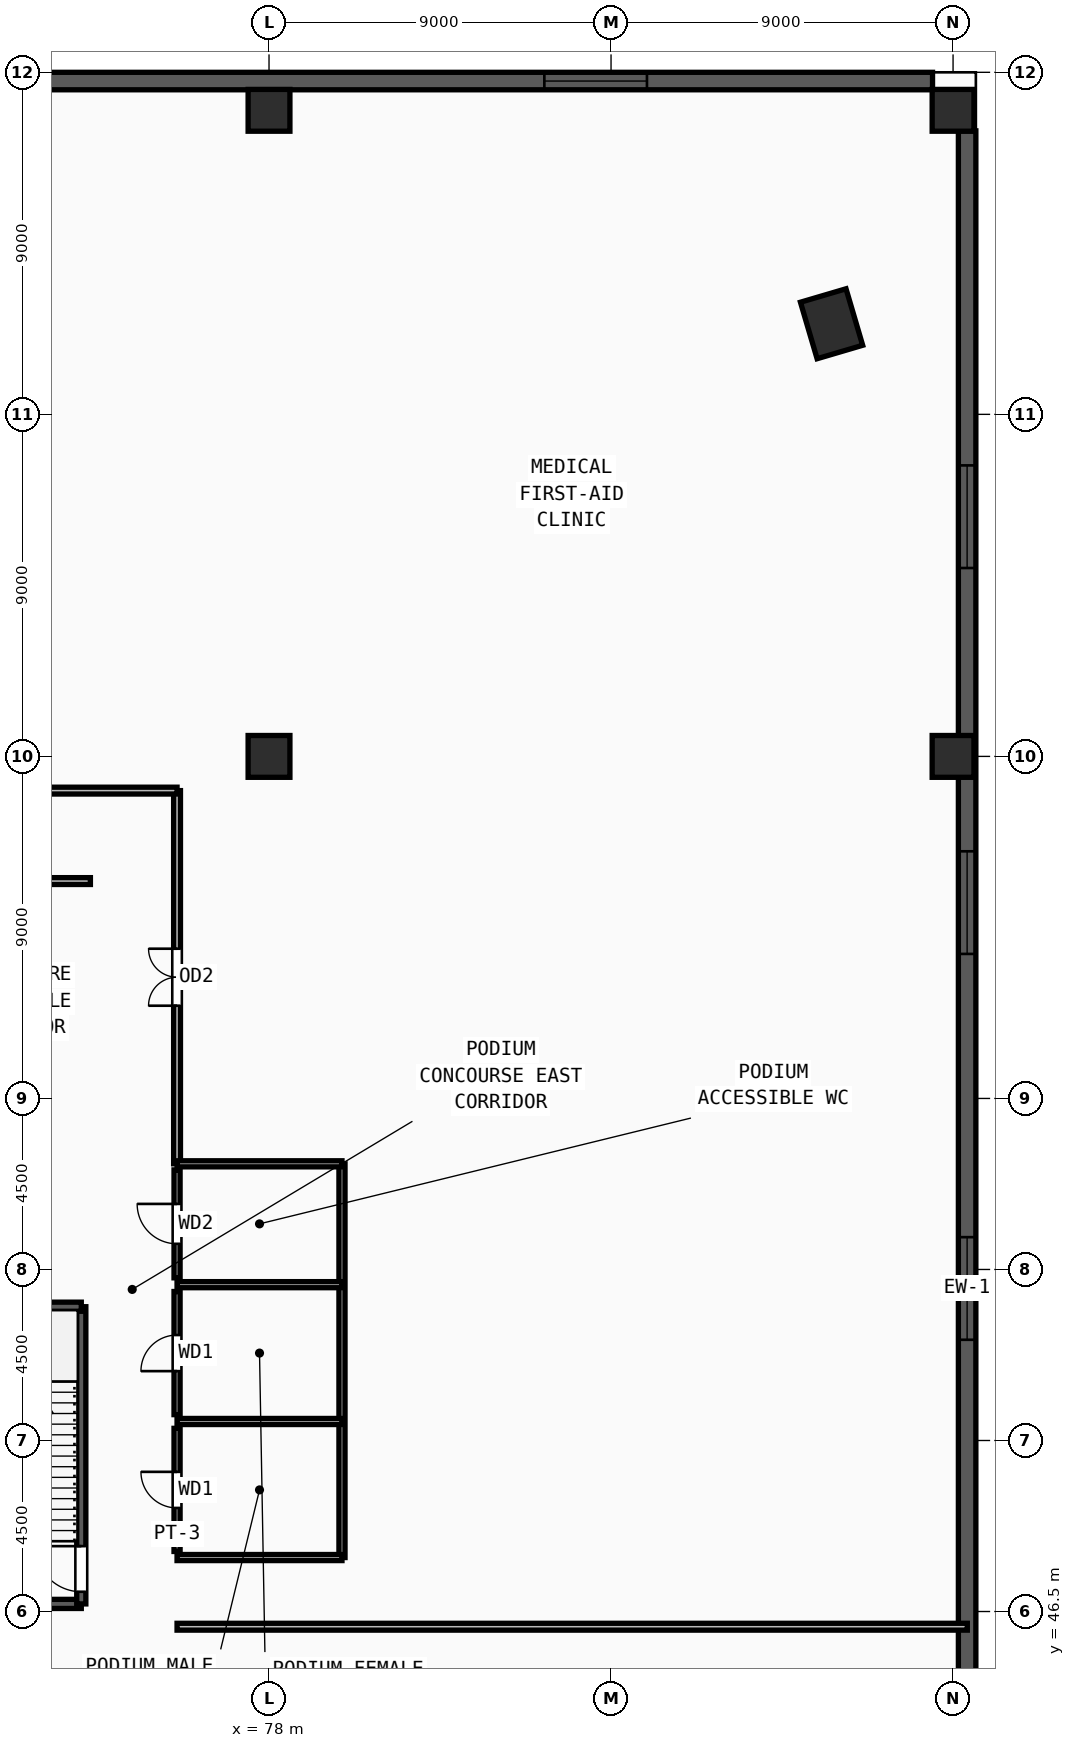
"""IFC4 building model, lengths in metres.
Left out: names, types, materials, properties, quantities, classifications, styles, units other than length and angle.
Written with IfcOpenShell. Run it as: python <this file> out.ifc"""

import sys

from ifc_helpers import new_model, si_unit, direction, frame, frame_2d, origin, origin_2d, place, context, subcontext, project, spatial, rectangle, extrude, source, transform, mapped, element, fill, save


model = new_model("IFC4")
c1 = context("Model", 3, precision=1e-05, world=origin(), true_north=direction((0.0, 1.0)))
c2 = subcontext(c1, "Body", "Model", "MODEL_VIEW")
j1 = project(units=[si_unit("LENGTHUNIT", "METRE"), si_unit("PLANEANGLEUNIT", "RADIAN")], contexts=[c1])
p1 = place(None, origin())
s1 = spatial("IfcSite", under=j1, at=p1, CompositionType="ELEMENT")
p2 = place(p1, origin())
s2 = spatial("IfcBuilding", under=s1, at=p2, CompositionType="ELEMENT")
p3 = place(p2, frame((0.0, 0.0, 23.4)))
s3 = spatial("IfcBuildingStorey", under=s2, at=p3, CompositionType="ELEMENT", Elevation=23.4)
m1 = source(origin(), c2, "Body", "SweptSolid", [
    extrude(rectangle(XDim=1.55, YDim=1.25, at=origin_2d()), origin(), (0.0, 0.0, 1.0), 5.1),
])
p4 = place(p3, frame((92.803, 80.384, 0.0), z_axis=(0.0, 0.0, 1.0), x_axis=(-0.282676303383, 0.959215360337, 0.0)))
e1 = element("IfcColumn", 1, at=p4, inside=s3, PredefinedType="COLUMN", context=c2, shape_type="MappedRepresentation", body=[
    mapped(m1, transform((0.0, 0.0, 0.0), x_axis=(1.0, 0.0, 0.0), y_axis=(0.0, 1.0, 0.0), z_axis=(0.0, 0.0, 1.0), scale=1.0)),
])
m2 = source(origin(), c2, "Body", "SweptSolid", [
    extrude(rectangle(XDim=1.1, YDim=1.1, at=origin_2d()), origin(), (0.0, 0.0, 1.0), 5.1),
])
for number, where, z_axis, x_axis in (
    (2, (78.0, 69.0, 0.0), (0.0, 0.0, 1.0), (1.0, 0.0, 0.0)),
    (3, (96.0, 69.0, 0.0), (0.0, 0.0, 1.0), (1.0, 0.0, 0.0)),
    (4, (78.0, 86.0, 0.0), (0.0, 0.0, 1.0), (1.0, 0.0, 0.0)),
    (5, (96.0, 86.0, 0.0), (0.0, 0.0, 1.0), (1.0, 0.0, 0.0)),
):
    element("IfcColumn", number, at=place(p3, frame(where, z_axis=z_axis, x_axis=x_axis)), inside=s3, PredefinedType="COLUMN", context=c2, shape_type="MappedRepresentation", body=[
        mapped(m2, transform((0.0, 0.0, 0.0), x_axis=(1.0, 0.0, 0.0), y_axis=(0.0, 1.0, 0.0), z_axis=(0.0, 0.0, 1.0), scale=1.0)),
    ])
p5 = place(p3, frame((96.37, 24.54, 0.0), z_axis=(0.0, 0.0, 1.0), x_axis=(0.0, 1.0, 0.0)))
e6 = element("IfcWall", 6, at=p5, inside=s3, PredefinedType="SOLIDWALL", context=c2, shape_type="SweptSolid", body=[
    extrude(rectangle(XDim=60.92, YDim=0.46, at=frame_2d((30.46, 0.0))), origin(), (0.0, 0.0, 1.0), 4.82),
])
m3 = source(origin(), c2, "Body", "SweptSolid", [
    extrude(rectangle(XDim=2.7, YDim=2.35, at=frame_2d((1.35, 1.175))), frame((0.0, 0.24, 0.0), z_axis=(0.0, -1.0, 0.0), x_axis=(1.0, 0.0, 0.0)), (0.0, 0.0, 1.0), 0.48),
])
p6 = place(p5, frame((8.803, 0.0, 0.55)))
e7 = element("IfcOpeningElement", 7, at=p6, cuts=e6, PredefinedType="OPENING", context=c2, shape_type="MappedRepresentation", body=[
    mapped(m3, transform((0.0, 0.0, 0.0), x_axis=(1.0, 0.0, 0.0), y_axis=(0.0, 1.0, 0.0), z_axis=(0.0, 0.0, 1.0), scale=1.0)),
])
p7 = place(p5, frame((29.11, 0.0, 0.55)))
e8 = element("IfcOpeningElement", 8, at=p7, cuts=e6, PredefinedType="OPENING", context=c2, shape_type="MappedRepresentation", body=[
    mapped(m3, transform((0.0, 0.0, 0.0), x_axis=(1.0, 0.0, 0.0), y_axis=(0.0, 1.0, 0.0), z_axis=(0.0, 0.0, 1.0), scale=1.0)),
])
p8 = place(p5, frame((39.263, 0.0, 0.55)))
e9 = element("IfcOpeningElement", 9, at=p8, cuts=e6, PredefinedType="OPENING", context=c2, shape_type="MappedRepresentation", body=[
    mapped(m3, transform((0.0, 0.0, 0.0), x_axis=(1.0, 0.0, 0.0), y_axis=(0.0, 1.0, 0.0), z_axis=(0.0, 0.0, 1.0), scale=1.0)),
])
p9 = place(p5, frame((49.417, 0.0, 0.55)))
e10 = element("IfcOpeningElement", 10, at=p9, cuts=e6, PredefinedType="OPENING", context=c2, shape_type="MappedRepresentation", body=[
    mapped(m3, transform((0.0, 0.0, 0.0), x_axis=(1.0, 0.0, 0.0), y_axis=(0.0, 1.0, 0.0), z_axis=(0.0, 0.0, 1.0), scale=1.0)),
])
p10 = place(p3, frame((95.46, 86.77, 0.0), z_axis=(0.0, 0.0, 1.0), x_axis=(-1.0, 0.0, 0.0)))
e11 = element("IfcWall", 11, at=p10, inside=s3, PredefinedType="SOLIDWALL", context=c2, shape_type="SweptSolid", body=[
    extrude(rectangle(XDim=70.92, YDim=0.46, at=frame_2d((35.46, 0.0))), origin(), (0.0, 0.0, 1.0), 4.82),
])
p11 = place(p10, frame((7.515, 0.0, 0.55)))
e12 = element("IfcOpeningElement", 12, at=p11, cuts=e11, PredefinedType="OPENING", context=c2, shape_type="MappedRepresentation", body=[
    mapped(m3, transform((0.0, 0.0, 0.0), x_axis=(1.0, 0.0, 0.0), y_axis=(0.0, 1.0, 0.0), z_axis=(0.0, 0.0, 1.0), scale=1.0)),
])
p12 = place(p10, frame((25.245, 0.0, 0.55)))
e13 = element("IfcOpeningElement", 13, at=p12, cuts=e11, PredefinedType="OPENING", context=c2, shape_type="MappedRepresentation", body=[
    mapped(m3, transform((0.0, 0.0, 0.0), x_axis=(1.0, 0.0, 0.0), y_axis=(0.0, 1.0, 0.0), z_axis=(0.0, 0.0, 1.0), scale=1.0)),
])
p13 = place(p10, frame((34.11, 0.0, 0.55)))
e14 = element("IfcOpeningElement", 14, at=p13, cuts=e11, PredefinedType="OPENING", context=c2, shape_type="MappedRepresentation", body=[
    mapped(m3, transform((0.0, 0.0, 0.0), x_axis=(1.0, 0.0, 0.0), y_axis=(0.0, 1.0, 0.0), z_axis=(0.0, 0.0, 1.0), scale=1.0)),
])
p14 = place(p10, frame((42.975, 0.0, 0.55)))
e15 = element("IfcOpeningElement", 15, at=p14, cuts=e11, PredefinedType="OPENING", context=c2, shape_type="MappedRepresentation", body=[
    mapped(m3, transform((0.0, 0.0, 0.0), x_axis=(1.0, 0.0, 0.0), y_axis=(0.0, 1.0, 0.0), z_axis=(0.0, 0.0, 1.0), scale=1.0)),
])
p15 = place(p10, frame((60.705, 0.0, 0.55)))
e16 = element("IfcOpeningElement", 16, at=p15, cuts=e11, PredefinedType="OPENING", context=c2, shape_type="MappedRepresentation", body=[
    mapped(m3, transform((0.0, 0.0, 0.0), x_axis=(1.0, 0.0, 0.0), y_axis=(0.0, 1.0, 0.0), z_axis=(0.0, 0.0, 1.0), scale=1.0)),
])
p16 = place(p3, frame((69.62, 46.7, 0.0), z_axis=(0.0, 0.0, 1.0), x_axis=(1.0, 0.0, 0.0)))
e17 = element("IfcWall", 17, at=p16, inside=s3, PredefinedType="SOLIDWALL", context=c2, shape_type="SweptSolid", body=[
    extrude(rectangle(XDim=3.44, YDim=0.24, at=frame_2d((1.72, 0.0))), origin(), (0.0, 0.0, 1.0), 3.335),
])
p17 = place(p3, frame((73.06, 46.7, 0.0), z_axis=(0.0, 0.0, 1.0), x_axis=(0.0, 1.0, 0.0)))
e18 = element("IfcWall", 18, at=p17, inside=s3, PredefinedType="SOLIDWALL", context=c2, shape_type="SweptSolid", body=[
    extrude(rectangle(XDim=7.82, YDim=0.24, at=frame_2d((3.91, 0.0))), origin(), (0.0, 0.0, 1.0), 4.82),
])
m4 = source(origin(), c2, "Body", "SweptSolid", [
    extrude(rectangle(XDim=1.2, YDim=2.2, at=frame_2d((0.6, 1.1))), frame((0.0, 0.13, 0.0), z_axis=(0.0, -1.0, 0.0), x_axis=(1.0, 0.0, 0.0)), (0.0, 0.0, 1.0), 0.26),
])
p18 = place(p17, frame((0.32, 0.0, 0.0)))
e19 = element("IfcOpeningElement", 19, at=p18, cuts=e18, PredefinedType="OPENING", context=c2, shape_type="MappedRepresentation", body=[
    mapped(m4, transform((0.0, 0.0, 0.0), x_axis=(1.0, 0.0, 0.0), y_axis=(0.0, 1.0, 0.0), z_axis=(0.0, 0.0, 1.0), scale=1.0)),
])
p19 = place(p3, frame((73.06, 54.52, 0.0), z_axis=(0.0, 0.0, 1.0), x_axis=(-1.0, 0.0, 0.0)))
e20 = element("IfcWall", 20, at=p19, inside=s3, PredefinedType="SOLIDWALL", context=c2, shape_type="SweptSolid", body=[
    extrude(rectangle(XDim=3.44, YDim=0.24, at=frame_2d((1.72, 0.0))), origin(), (0.0, 0.0, 1.0), 4.82),
])
p20 = place(p3, frame((75.58, 48.08, 0.0), z_axis=(0.0, 0.0, 1.0), x_axis=(0.0, 1.0, 0.0)))
e21 = element("IfcWall", 21, at=p20, inside=s3, PredefinedType="PARTITIONING", context=c2, shape_type="SweptSolid", body=[
    extrude(rectangle(XDim=3.24, YDim=0.16, at=frame_2d((1.62, 0.0))), origin(), (0.0, 0.0, 1.0), 4.82),
])
m5 = source(origin(), c2, "Body", "SweptSolid", [
    extrude(rectangle(XDim=0.95, YDim=2.15, at=frame_2d((0.475, 1.075))), frame((0.0, 0.09, 0.0), z_axis=(0.0, -1.0, 0.0), x_axis=(1.0, 0.0, 0.0)), (0.0, 0.0, 1.0), 0.18),
])
p21 = place(p20, frame((1.145, 0.0, 0.0)))
e22 = element("IfcOpeningElement", 22, at=p21, cuts=e21, PredefinedType="OPENING", context=c2, shape_type="MappedRepresentation", body=[
    mapped(m5, transform((0.0, 0.0, 0.0), x_axis=(1.0, 0.0, 0.0), y_axis=(0.0, 1.0, 0.0), z_axis=(0.0, 0.0, 1.0), scale=1.0)),
])
p22 = place(p3, frame((75.58, 51.68, 0.0), z_axis=(0.0, 0.0, 1.0), x_axis=(0.0, 1.0, 0.0)))
e23 = element("IfcWall", 23, at=p22, inside=s3, PredefinedType="PARTITIONING", context=c2, shape_type="SweptSolid", body=[
    extrude(rectangle(XDim=3.24, YDim=0.16, at=frame_2d((1.62, 0.0))), origin(), (0.0, 0.0, 1.0), 4.82),
])
p23 = place(p22, frame((1.145, 0.0, 0.0)))
e24 = element("IfcOpeningElement", 24, at=p23, cuts=e23, PredefinedType="OPENING", context=c2, shape_type="MappedRepresentation", body=[
    mapped(m5, transform((0.0, 0.0, 0.0), x_axis=(1.0, 0.0, 0.0), y_axis=(0.0, 1.0, 0.0), z_axis=(0.0, 0.0, 1.0), scale=1.0)),
])
p24 = place(p3, frame((75.58, 55.28, 0.0), z_axis=(0.0, 0.0, 1.0), x_axis=(0.0, 1.0, 0.0)))
e25 = element("IfcWall", 25, at=p24, inside=s3, PredefinedType="PARTITIONING", context=c2, shape_type="SweptSolid", body=[
    extrude(rectangle(XDim=2.84, YDim=0.16, at=frame_2d((1.42, 0.0))), origin(), (0.0, 0.0, 1.0), 4.82),
])
m6 = source(origin(), c2, "Body", "SweptSolid", [
    extrude(rectangle(XDim=1.05, YDim=2.15, at=frame_2d((0.525, 1.075))), frame((0.0, 0.09, 0.0), z_axis=(0.0, -1.0, 0.0), x_axis=(1.0, 0.0, 0.0)), (0.0, 0.0, 1.0), 0.18),
])
p25 = place(p24, frame((0.895, 0.0, 0.0)))
e26 = element("IfcOpeningElement", 26, at=p25, cuts=e25, PredefinedType="OPENING", context=c2, shape_type="MappedRepresentation", body=[
    mapped(m6, transform((0.0, 0.0, 0.0), x_axis=(1.0, 0.0, 0.0), y_axis=(0.0, 1.0, 0.0), z_axis=(0.0, 0.0, 1.0), scale=1.0)),
])
p26 = place(p3, frame((69.46, 65.72, 0.0), z_axis=(0.0, 0.0, 1.0), x_axis=(1.0, 0.0, 0.0)))
e27 = element("IfcWall", 27, at=p26, inside=s3, PredefinedType="PARTITIONING", context=c2, shape_type="SweptSolid", body=[
    extrude(rectangle(XDim=3.84, YDim=0.18, at=frame_2d((1.92, 0.0))), origin(), (0.0, 0.0, 1.0), 4.82),
])
m7 = source(origin(), c2, "Body", "SweptSolid", [
    extrude(rectangle(XDim=1.3, YDim=2.2, at=frame_2d((0.65, 1.1))), frame((0.0, 0.1, 0.0), z_axis=(0.0, -1.0, 0.0), x_axis=(1.0, 0.0, 0.0)), (0.0, 0.0, 1.0), 0.2),
])
p27 = place(p26, frame((1.27, 0.0, 0.0)))
e28 = element("IfcOpeningElement", 28, at=p27, cuts=e27, PredefinedType="OPENING", context=c2, shape_type="MappedRepresentation", body=[
    mapped(m7, transform((0.0, 0.0, 0.0), x_axis=(1.0, 0.0, 0.0), y_axis=(0.0, 1.0, 0.0), z_axis=(0.0, 0.0, 1.0), scale=1.0)),
])
p28 = place(p3, frame((75.58, 58.28, 0.0), z_axis=(0.0, 0.0, 1.0), x_axis=(0.0, 1.0, 0.0)))
e29 = element("IfcWall", 29, at=p28, inside=s3, PredefinedType="PARTITIONING", context=c2, shape_type="SweptSolid", body=[
    extrude(rectangle(XDim=9.82, YDim=0.18, at=frame_2d((4.91, 0.0))), origin(), (0.0, 0.0, 1.0), 4.82),
])
m8 = source(origin(), c2, "Body", "SweptSolid", [
    extrude(rectangle(XDim=1.5, YDim=2.2, at=frame_2d((0.75, 1.1))), frame((0.0, 0.1, 0.0), z_axis=(0.0, -1.0, 0.0), x_axis=(1.0, 0.0, 0.0)), (0.0, 0.0, 1.0), 0.2),
])
p29 = place(p28, frame((4.16, 0.0, 0.0)))
e30 = element("IfcOpeningElement", 30, at=p29, cuts=e29, PredefinedType="OPENING", context=c2, shape_type="MappedRepresentation", body=[
    mapped(m8, transform((0.0, 0.0, 0.0), x_axis=(1.0, 0.0, 0.0), y_axis=(0.0, 1.0, 0.0), z_axis=(0.0, 0.0, 1.0), scale=1.0)),
])
p30 = place(p3, frame((79.92, 47.92, 0.0), z_axis=(0.0, 0.0, 1.0), x_axis=(0.0, 1.0, 0.0)))
e31 = element("IfcWall", 31, at=p30, inside=s3, PredefinedType="PARTITIONING", context=c2, shape_type="SweptSolid", body=[
    extrude(rectangle(XDim=10.36, YDim=0.16, at=frame_2d((5.18, 0.0))), origin(), (0.0, 0.0, 1.0), 4.82),
])
for number, where, z_axis, x_axis in (
    (32, (75.58, 47.92, 0.0), (0.0, 0.0, 1.0), (1.0, 0.0, 0.0)),
    (33, (75.58, 51.5, 0.0), (0.0, 0.0, 1.0), (1.0, 0.0, 0.0)),
    (34, (75.58, 55.1, 0.0), (0.0, 0.0, 1.0), (1.0, 0.0, 0.0)),
    (35, (75.58, 58.28, 0.0), (0.0, 0.0, 1.0), (1.0, 0.0, 0.0)),
):
    element("IfcWall", number, at=place(p3, frame(where, z_axis=z_axis, x_axis=x_axis)), inside=s3, PredefinedType="PARTITIONING", context=c2, shape_type="SweptSolid", body=[
        extrude(rectangle(XDim=4.34, YDim=0.16, at=frame_2d((2.17, 0.0))), origin(), (0.0, 0.0, 1.0), 4.82),
    ])
p31 = place(p3, frame((75.58, 46.1, 0.0), z_axis=(0.0, 0.0, 1.0), x_axis=(1.0, 0.0, 0.0)))
e36 = element("IfcWall", 36, at=p31, inside=s3, PredefinedType="PARTITIONING", context=c2, shape_type="SweptSolid", body=[
    extrude(rectangle(XDim=20.795, YDim=0.18, at=frame_2d((10.397, 0.0))), origin(), (0.0, 0.0, 1.0), 4.82),
])
p32 = place(p3, frame((71.7, 68.1, 0.0), z_axis=(0.0, 0.0, 1.0), x_axis=(1.0, 0.0, 0.0)))
e37 = element("IfcWall", 37, at=p32, inside=s3, PredefinedType="PARTITIONING", context=c2, shape_type="SweptSolid", body=[
    extrude(rectangle(XDim=3.88, YDim=0.18, at=frame_2d((1.94, 0.0))), origin(), (0.0, 0.0, 1.0), 4.82),
])
m9 = source(origin(), c2, "Body", "SweptSolid", [
    extrude(rectangle(XDim=2.7, YDim=2.35, at=frame_2d((1.35, 1.175))), frame((0.0, 0.03, 0.0), z_axis=(0.0, -1.0, 0.0), x_axis=(1.0, 0.0, 0.0)), (0.0, 0.0, 1.0), 0.06),
])
p33 = place(p7, origin())
e38 = element("IfcWindow", 38, at=p33, inside=s3, PartitioningType="TRIPLE_PANEL_VERTICAL", PredefinedType="WINDOW", context=c2, shape_type="MappedRepresentation", body=[
    mapped(m9, transform((0.0, 0.0, 0.0), x_axis=(1.0, 0.0, 0.0), y_axis=(0.0, 1.0, 0.0), z_axis=(0.0, 0.0, 1.0), scale=1.0)),
])
fill(e8, e38)
p34 = place(p8, origin())
e39 = element("IfcWindow", 39, at=p34, inside=s3, PartitioningType="TRIPLE_PANEL_VERTICAL", PredefinedType="WINDOW", context=c2, shape_type="MappedRepresentation", body=[
    mapped(m9, transform((0.0, 0.0, 0.0), x_axis=(1.0, 0.0, 0.0), y_axis=(0.0, 1.0, 0.0), z_axis=(0.0, 0.0, 1.0), scale=1.0)),
])
fill(e9, e39)
p35 = place(p9, origin())
e40 = element("IfcWindow", 40, at=p35, inside=s3, PartitioningType="TRIPLE_PANEL_VERTICAL", PredefinedType="WINDOW", context=c2, shape_type="MappedRepresentation", body=[
    mapped(m9, transform((0.0, 0.0, 0.0), x_axis=(1.0, 0.0, 0.0), y_axis=(0.0, 1.0, 0.0), z_axis=(0.0, 0.0, 1.0), scale=1.0)),
])
fill(e10, e40)
p36 = place(p11, origin())
e41 = element("IfcWindow", 41, at=p36, inside=s3, PartitioningType="TRIPLE_PANEL_VERTICAL", PredefinedType="WINDOW", context=c2, shape_type="MappedRepresentation", body=[
    mapped(m9, transform((0.0, 0.0, 0.0), x_axis=(1.0, 0.0, 0.0), y_axis=(0.0, 1.0, 0.0), z_axis=(0.0, 0.0, 1.0), scale=1.0)),
])
fill(e12, e41)
m10 = source(origin(), c2, "Body", "SweptSolid", [
    extrude(rectangle(XDim=1.2, YDim=2.2, at=frame_2d((0.6, 1.1))), frame((0.0, 0.025, 0.0), z_axis=(0.0, -1.0, 0.0), x_axis=(1.0, 0.0, 0.0)), (0.0, 0.0, 1.0), 0.05),
])
p37 = place(p18, origin())
e42 = element("IfcDoor", 42, at=p37, inside=s3, OperationType="SINGLE_SWING_RIGHT", PredefinedType="DOOR", context=c2, shape_type="MappedRepresentation", body=[
    mapped(m10, transform((0.0, 0.0, 0.0), x_axis=(1.0, 0.0, 0.0), y_axis=(0.0, 1.0, 0.0), z_axis=(0.0, 0.0, 1.0), scale=1.0)),
])
fill(e19, e42)
m11 = source(origin(), c2, "Body", "SweptSolid", [
    extrude(rectangle(XDim=0.95, YDim=2.15, at=frame_2d((0.475, 1.075))), frame((0.0, 0.025, 0.0), z_axis=(0.0, -1.0, 0.0), x_axis=(1.0, 0.0, 0.0)), (0.0, 0.0, 1.0), 0.05),
])
p38 = place(p21, origin())
e43 = element("IfcDoor", 43, at=p38, inside=s3, OperationType="SINGLE_SWING_RIGHT", PredefinedType="DOOR", context=c2, shape_type="MappedRepresentation", body=[
    mapped(m11, transform((0.0, 0.0, 0.0), x_axis=(1.0, 0.0, 0.0), y_axis=(0.0, 1.0, 0.0), z_axis=(0.0, 0.0, 1.0), scale=1.0)),
])
fill(e22, e43)
p39 = place(p23, origin())
e44 = element("IfcDoor", 44, at=p39, inside=s3, OperationType="SINGLE_SWING_LEFT", PredefinedType="DOOR", context=c2, shape_type="MappedRepresentation", body=[
    mapped(m11, transform((0.0, 0.0, 0.0), x_axis=(1.0, 0.0, 0.0), y_axis=(0.0, 1.0, 0.0), z_axis=(0.0, 0.0, 1.0), scale=1.0)),
])
fill(e24, e44)
m12 = source(origin(), c2, "Body", "SweptSolid", [
    extrude(rectangle(XDim=1.05, YDim=2.15, at=frame_2d((0.525, 1.075))), frame((0.0, 0.025, 0.0), z_axis=(0.0, -1.0, 0.0), x_axis=(1.0, 0.0, 0.0)), (0.0, 0.0, 1.0), 0.05),
])
p40 = place(p25, origin())
e45 = element("IfcDoor", 45, at=p40, inside=s3, OperationType="SINGLE_SWING_RIGHT", PredefinedType="DOOR", context=c2, shape_type="MappedRepresentation", body=[
    mapped(m12, transform((0.0, 0.0, 0.0), x_axis=(1.0, 0.0, 0.0), y_axis=(0.0, 1.0, 0.0), z_axis=(0.0, 0.0, 1.0), scale=1.0)),
])
fill(e26, e45)
m13 = source(origin(), c2, "Body", "SweptSolid", [
    extrude(rectangle(XDim=1.5, YDim=2.2, at=frame_2d((0.75, 1.1))), frame((0.0, 0.025, 0.0), z_axis=(0.0, -1.0, 0.0), x_axis=(1.0, 0.0, 0.0)), (0.0, 0.0, 1.0), 0.05),
])
p41 = place(p29, origin())
e46 = element("IfcDoor", 46, at=p41, inside=s3, OperationType="DOUBLE_DOOR_SINGLE_SWING", PredefinedType="DOOR", context=c2, shape_type="MappedRepresentation", body=[
    mapped(m13, transform((0.0, 0.0, 0.0), x_axis=(1.0, 0.0, 0.0), y_axis=(0.0, 1.0, 0.0), z_axis=(0.0, 0.0, 1.0), scale=1.0)),
])
fill(e30, e46)
save(model, sys.argv[1])
